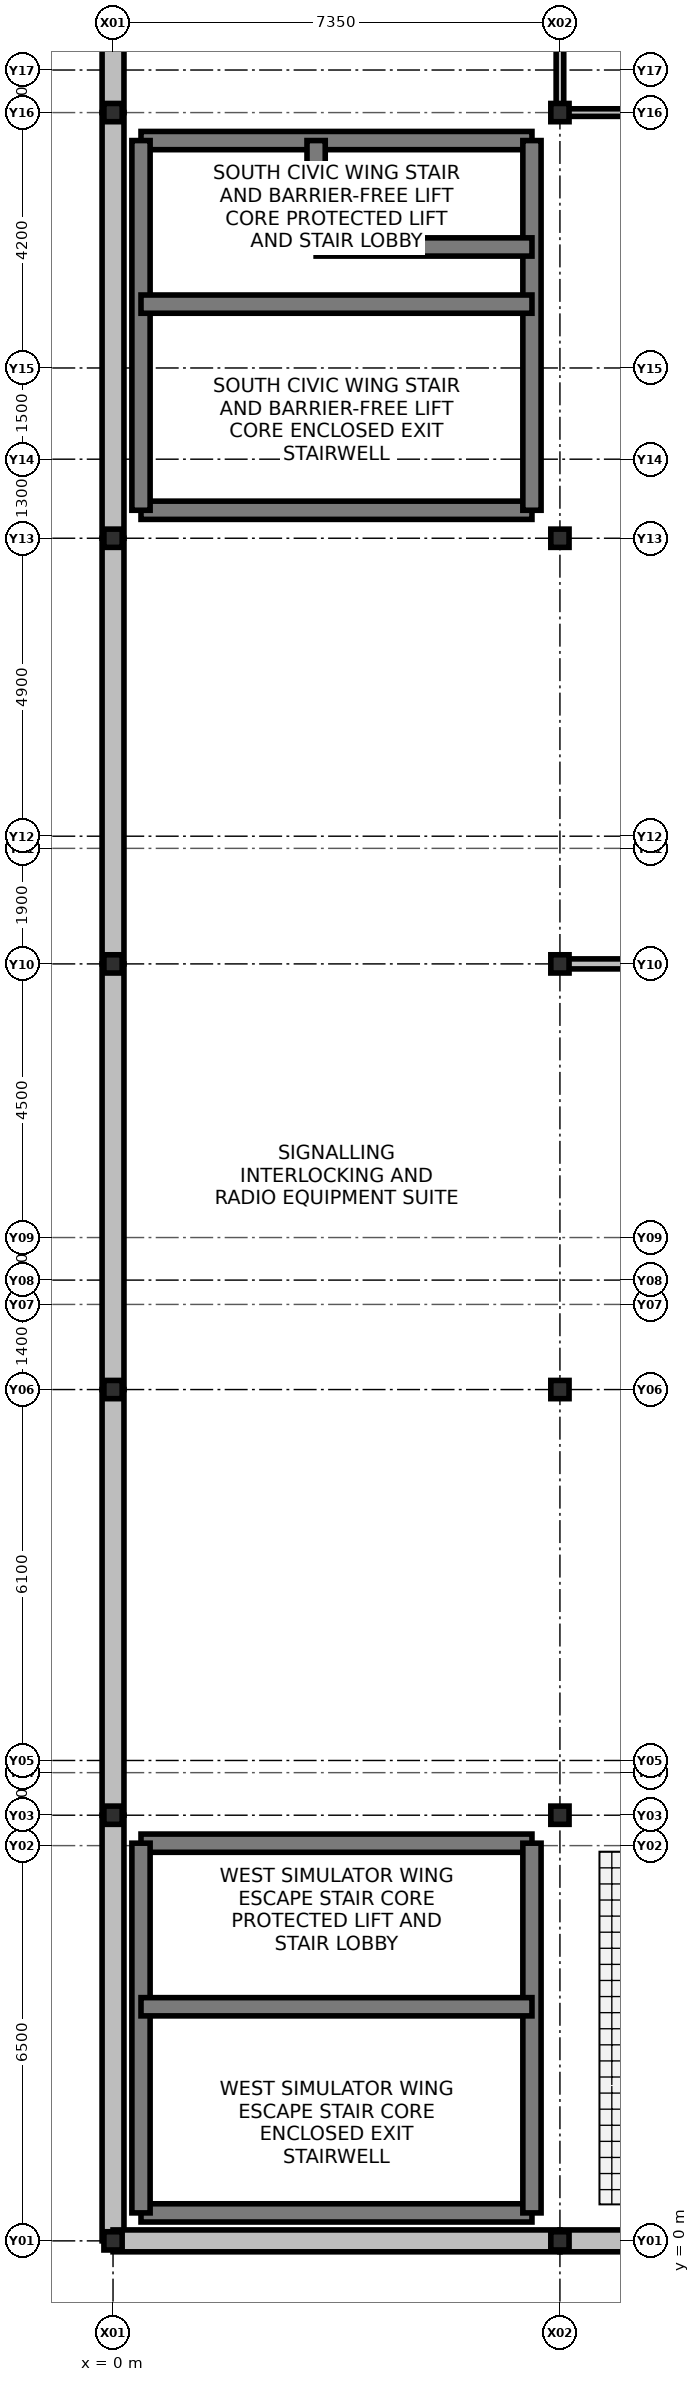
"""IFC4 building model, lengths in metres.
Left out: names, types, materials, properties, quantities, classifications, styles, units other than length and angle.
Written with IfcOpenShell. Run it as: python <this file> out.ifc"""

import sys

from ifc_helpers import new_model, si_unit, direction, frame, frame_2d, origin, origin_with_axes, origin_2d, place, context, subcontext, project, spatial, rectangle, i_section, extrude, element, fill, save


model = new_model("IFC4")
c1 = context("Model", 3, precision=1e-05, world=origin(), true_north=direction((0.0, 1.0)))
c2 = subcontext(c1, "Body", "Model", "MODEL_VIEW")
j1 = project(units=[si_unit("LENGTHUNIT", "METRE"), si_unit("PLANEANGLEUNIT", "RADIAN")], contexts=[c1])
p1 = place(None, origin())
s1 = spatial("IfcSite", under=j1, at=p1, CompositionType="ELEMENT")
p2 = place(p1, origin())
s2 = spatial("IfcBuilding", under=s1, at=p2, CompositionType="ELEMENT")
p3 = place(p2, frame((0.0, 0.0, 11.1)))
s3 = spatial("IfcBuildingStorey", under=s2, at=p3, CompositionType="ELEMENT", Elevation=11.1)
for number, where, z_axis, x_axis in (
    (1, (0.0, 0.0, 0.0), (0.0, 0.0, 1.0), (1.0, 0.0, 0.0)),
    (2, (0.0, 7.0, 0.0), (0.0, 0.0, 1.0), (1.0, 0.0, 0.0)),
    (3, (0.0, 14.0, 0.0), (0.0, 0.0, 1.0), (1.0, 0.0, 0.0)),
    (4, (0.0, 21.0, 0.0), (0.0, 0.0, 1.0), (1.0, 0.0, 0.0)),
    (5, (0.0, 28.0, 0.0), (0.0, 0.0, 1.0), (1.0, 0.0, 0.0)),
    (6, (0.0, 35.0, 0.0), (0.0, 0.0, 1.0), (1.0, 0.0, 0.0)),
    (7, (7.35, 0.0, 0.0), (0.0, 0.0, 1.0), (1.0, 0.0, 0.0)),
    (8, (7.35, 7.0, 0.0), (0.0, 0.0, 1.0), (1.0, 0.0, 0.0)),
    (9, (7.35, 14.0, 0.0), (0.0, 0.0, 1.0), (1.0, 0.0, 0.0)),
    (10, (7.35, 21.0, 0.0), (0.0, 0.0, 1.0), (1.0, 0.0, 0.0)),
    (11, (7.35, 28.0, 0.0), (0.0, 0.0, 1.0), (1.0, 0.0, 0.0)),
    (12, (7.35, 35.0, 0.0), (0.0, 0.0, 1.0), (1.0, 0.0, 0.0)),
):
    element("IfcColumn", number, at=place(p3, frame(where, z_axis=z_axis, x_axis=x_axis)), inside=s3, PredefinedType="COLUMN", context=c2, shape_type="SweptSolid", body=[
        extrude(i_section(OverallWidth=0.3, OverallDepth=0.3, WebThickness=0.01, FlangeThickness=0.015, at=origin_2d()), origin(), (0.0, 0.0, 1.0), 4.2),
    ])
p4 = place(p3, frame((0.0, 0.0, 0.0), z_axis=(0.0, 0.0, 1.0), x_axis=(0.0, 1.0, 0.0)))
e13 = element("IfcWall", 13, at=p4, inside=s3, PredefinedType="SOLIDWALL", context=c2, shape_type="SweptSolid", body=[
    extrude(rectangle(XDim=7.0, YDim=0.36, at=frame_2d((3.5, 0.0))), origin(), (0.0, 0.0, 1.0), 3.35),
])
p5 = place(p4, frame((2.2, 0.0, 0.95)))
e14 = element("IfcOpeningElement", 14, at=p5, cuts=e13, PredefinedType="OPENING", context=c2, shape_type="SweptSolid", body=[
    extrude(rectangle(XDim=2.3, YDim=1.85, at=frame_2d((1.15, 0.925))), frame((0.0, 0.19, 0.0), z_axis=(0.0, -1.0, 0.0), x_axis=(1.0, 0.0, 0.0)), (0.0, 0.0, 1.0), 0.38),
])
p6 = place(p3, frame((0.0, 7.0, 0.0), z_axis=(0.0, 0.0, 1.0), x_axis=(0.0, 1.0, 0.0)))
e15 = element("IfcWall", 15, at=p6, inside=s3, PredefinedType="SOLIDWALL", context=c2, shape_type="SweptSolid", body=[
    extrude(rectangle(XDim=7.0, YDim=0.36, at=frame_2d((3.5, 0.0))), origin(), (0.0, 0.0, 1.0), 3.35),
])
p7 = place(p6, frame((2.2, 0.0, 0.95)))
e16 = element("IfcOpeningElement", 16, at=p7, cuts=e15, PredefinedType="OPENING", context=c2, shape_type="SweptSolid", body=[
    extrude(rectangle(XDim=2.95, YDim=2.15, at=frame_2d((1.475, 1.075))), frame((0.0, 0.19, 0.0), z_axis=(0.0, -1.0, 0.0), x_axis=(1.0, 0.0, 0.0)), (0.0, 0.0, 1.0), 0.38),
])
p8 = place(p3, frame((0.0, 14.0, 0.0), z_axis=(0.0, 0.0, 1.0), x_axis=(0.0, 1.0, 0.0)))
e17 = element("IfcWall", 17, at=p8, inside=s3, PredefinedType="SOLIDWALL", context=c2, shape_type="SweptSolid", body=[
    extrude(rectangle(XDim=7.0, YDim=0.36, at=frame_2d((3.5, 0.0))), origin(), (0.0, 0.0, 1.0), 3.35),
])
p9 = place(p8, frame((2.2, 0.0, 0.95)))
e18 = element("IfcOpeningElement", 18, at=p9, cuts=e17, PredefinedType="OPENING", context=c2, shape_type="SweptSolid", body=[
    extrude(rectangle(XDim=1.2, YDim=1.5, at=frame_2d((0.6, 0.75))), frame((0.0, 0.19, 0.0), z_axis=(0.0, -1.0, 0.0), x_axis=(1.0, 0.0, 0.0)), (0.0, 0.0, 1.0), 0.38),
])
p10 = place(p3, frame((0.0, 21.0, 0.0), z_axis=(0.0, 0.0, 1.0), x_axis=(0.0, 1.0, 0.0)))
e19 = element("IfcWall", 19, at=p10, inside=s3, PredefinedType="SOLIDWALL", context=c2, shape_type="SweptSolid", body=[
    extrude(rectangle(XDim=7.0, YDim=0.36, at=frame_2d((3.5, 0.0))), origin(), (0.0, 0.0, 1.0), 3.35),
])
p11 = place(p10, frame((2.2, 0.0, 0.95)))
e20 = element("IfcOpeningElement", 20, at=p11, cuts=e19, PredefinedType="OPENING", context=c2, shape_type="SweptSolid", body=[
    extrude(rectangle(XDim=1.8, YDim=2.1, at=frame_2d((0.9, 1.05))), frame((0.0, 0.19, 0.0), z_axis=(0.0, -1.0, 0.0), x_axis=(1.0, 0.0, 0.0)), (0.0, 0.0, 1.0), 0.38),
])
p12 = place(p3, frame((0.0, 28.0, 0.0), z_axis=(0.0, 0.0, 1.0), x_axis=(0.0, 1.0, 0.0)))
e21 = element("IfcWall", 21, at=p12, inside=s3, PredefinedType="SOLIDWALL", context=c2, shape_type="SweptSolid", body=[
    extrude(rectangle(XDim=7.0, YDim=0.36, at=frame_2d((3.5, 0.0))), origin(), (0.0, 0.0, 1.0), 3.35),
])
p13 = place(p12, frame((2.2, 0.0, 0.95)))
e22 = element("IfcOpeningElement", 22, at=p13, cuts=e21, PredefinedType="OPENING", context=c2, shape_type="SweptSolid", body=[
    extrude(rectangle(XDim=2.6, YDim=2.0, at=frame_2d((1.3, 1.0))), frame((0.0, 0.19, 0.0), z_axis=(0.0, -1.0, 0.0), x_axis=(1.0, 0.0, 0.0)), (0.0, 0.0, 1.0), 0.38),
])
p14 = place(p3, frame((0.0, 35.0, 0.0), z_axis=(0.0, 0.0, 1.0), x_axis=(0.0, 1.0, 0.0)))
e23 = element("IfcWall", 23, at=p14, inside=s3, PredefinedType="SOLIDWALL", context=c2, shape_type="SweptSolid", body=[
    extrude(rectangle(XDim=7.0, YDim=0.36, at=frame_2d((3.5, 0.0))), origin(), (0.0, 0.0, 1.0), 3.35),
])
p15 = place(p14, frame((2.2, 0.0, 0.95)))
e24 = element("IfcOpeningElement", 24, at=p15, cuts=e23, PredefinedType="OPENING", context=c2, shape_type="SweptSolid", body=[
    extrude(rectangle(XDim=3.4, YDim=2.2, at=frame_2d((1.7, 1.1))), frame((0.0, 0.19, 0.0), z_axis=(0.0, -1.0, 0.0), x_axis=(1.0, 0.0, 0.0)), (0.0, 0.0, 1.0), 0.38),
])
p16 = place(p3, origin_with_axes())
e25 = element("IfcWall", 25, at=p16, inside=s3, PredefinedType="SOLIDWALL", context=c2, shape_type="SweptSolid", body=[
    extrude(rectangle(XDim=7.35, YDim=0.36, at=frame_2d((3.675, 0.0))), origin(), (0.0, 0.0, 1.0), 3.35),
])
p17 = place(p16, frame((2.4, 0.0, 0.9)))
e26 = element("IfcOpeningElement", 26, at=p17, cuts=e25, PredefinedType="OPENING", context=c2, shape_type="SweptSolid", body=[
    extrude(rectangle(XDim=2.0, YDim=1.8, at=frame_2d((1.0, 0.9))), frame((0.0, 0.19, 0.0), z_axis=(0.0, -1.0, 0.0), x_axis=(1.0, 0.0, 0.0)), (0.0, 0.0, 1.0), 0.38),
])
p18 = place(p3, frame((7.35, 0.0, 0.0), z_axis=(0.0, 0.0, 1.0), x_axis=(1.0, 0.0, 0.0)))
e27 = element("IfcWall", 27, at=p18, inside=s3, PredefinedType="SOLIDWALL", context=c2, shape_type="SweptSolid", body=[
    extrude(rectangle(XDim=7.35, YDim=0.36, at=frame_2d((3.675, 0.0))), origin(), (0.0, 0.0, 1.0), 3.35),
])
p19 = place(p18, frame((2.4, 0.0, 0.9)))
e28 = element("IfcOpeningElement", 28, at=p19, cuts=e27, PredefinedType="OPENING", context=c2, shape_type="SweptSolid", body=[
    extrude(rectangle(XDim=2.1, YDim=2.1, at=frame_2d((1.05, 1.05))), frame((0.0, 0.19, 0.0), z_axis=(0.0, -1.0, 0.0), x_axis=(1.0, 0.0, 0.0)), (0.0, 0.0, 1.0), 0.38),
])
p20 = place(p3, frame((0.46, 28.46, 0.0), z_axis=(0.0, 0.0, 1.0), x_axis=(1.0, 0.0, 0.0)))
e29 = element("IfcWall", 29, at=p20, inside=s3, PredefinedType="SHEAR", context=c2, shape_type="SweptSolid", body=[
    extrude(rectangle(XDim=6.43, YDim=0.3, at=frame_2d((3.215, 0.0))), origin(), (0.0, 0.0, 1.0), 3.92),
])
p21 = place(p3, frame((0.46, 34.54, 0.0), z_axis=(0.0, 0.0, 1.0), x_axis=(1.0, 0.0, 0.0)))
e30 = element("IfcWall", 30, at=p21, inside=s3, PredefinedType="SHEAR", context=c2, shape_type="SweptSolid", body=[
    extrude(rectangle(XDim=6.43, YDim=0.3, at=frame_2d((3.215, 0.0))), origin(), (0.0, 0.0, 1.0), 3.92),
])
p22 = place(p21, frame((0.55, 0.0, 0.0)))
e31 = element("IfcOpeningElement", 31, at=p22, cuts=e30, PredefinedType="OPENING", context=c2, shape_type="SweptSolid", body=[
    extrude(rectangle(XDim=1.5, YDim=2.2, at=frame_2d((0.75, 1.1))), frame((0.0, 0.16, 0.0), z_axis=(0.0, -1.0, 0.0), x_axis=(1.0, 0.0, 0.0)), (0.0, 0.0, 1.0), 0.32),
])
for number, where, z_axis, x_axis in (
    (32, (0.46, 28.46, 0.0), (0.0, 0.0, 1.0), (0.0, 1.0, 0.0)),
    (33, (6.89, 28.46, 0.0), (0.0, 0.0, 1.0), (0.0, 1.0, 0.0)),
):
    element("IfcWall", number, at=place(p3, frame(where, z_axis=z_axis, x_axis=x_axis)), inside=s3, PredefinedType="SHEAR", context=c2, shape_type="SweptSolid", body=[
        extrude(rectangle(XDim=6.08, YDim=0.3, at=frame_2d((3.04, 0.0))), origin(), (0.0, 0.0, 1.0), 3.92),
    ])
p23 = place(p3, frame((0.46, 31.85, 0.0), z_axis=(0.0, 0.0, 1.0), x_axis=(1.0, 0.0, 0.0)))
e34 = element("IfcWall", 34, at=p23, inside=s3, PredefinedType="SHEAR", context=c2, shape_type="SweptSolid", body=[
    extrude(rectangle(XDim=6.43, YDim=0.3, at=frame_2d((3.215, 0.0))), origin(), (0.0, 0.0, 1.0), 3.92),
])
p24 = place(p23, frame((0.185, 0.0, 0.0)))
e35 = element("IfcOpeningElement", 35, at=p24, cuts=e34, PredefinedType="OPENING", context=c2, shape_type="SweptSolid", body=[
    extrude(rectangle(XDim=1.05, YDim=2.15, at=frame_2d((0.525, 1.075))), frame((0.0, 0.16, 0.0), z_axis=(0.0, -1.0, 0.0), x_axis=(1.0, 0.0, 0.0)), (0.0, 0.0, 1.0), 0.32),
])
p25 = place(p3, frame((3.34, 32.79, 0.0), z_axis=(0.0, 0.0, 1.0), x_axis=(0.0, 1.0, 0.0)))
e36 = element("IfcWall", 36, at=p25, inside=s3, PredefinedType="SHEAR", context=c2, shape_type="SweptSolid", body=[
    extrude(rectangle(XDim=1.75, YDim=0.3, at=frame_2d((0.875, 0.0))), origin(), (0.0, 0.0, 1.0), 3.92),
])
p26 = place(p3, frame((3.34, 32.79, 0.0), z_axis=(0.0, 0.0, 1.0), x_axis=(1.0, 0.0, 0.0)))
e37 = element("IfcWall", 37, at=p26, inside=s3, PredefinedType="SHEAR", context=c2, shape_type="SweptSolid", body=[
    extrude(rectangle(XDim=3.55, YDim=0.3, at=frame_2d((1.775, 0.0))), origin(), (0.0, 0.0, 1.0), 3.92),
])
p27 = place(p26, frame((0.25, 0.0, 0.0)))
e38 = element("IfcOpeningElement", 38, at=p27, cuts=e37, PredefinedType="OPENING", context=c2, shape_type="SweptSolid", body=[
    extrude(rectangle(XDim=1.1, YDim=2.15, at=frame_2d((0.55, 1.075))), frame((0.0, 0.16, 0.0), z_axis=(0.0, -1.0, 0.0), x_axis=(1.0, 0.0, 0.0)), (0.0, 0.0, 1.0), 0.32),
])
p28 = place(p26, frame((1.75, 0.0, 0.0)))
e39 = element("IfcOpeningElement", 39, at=p28, cuts=e37, PredefinedType="OPENING", context=c2, shape_type="SweptSolid", body=[
    extrude(rectangle(XDim=1.2, YDim=2.2, at=frame_2d((0.6, 1.1))), frame((0.0, 0.16, 0.0), z_axis=(0.0, -1.0, 0.0), x_axis=(1.0, 0.0, 0.0)), (0.0, 0.0, 1.0), 0.32),
])
p29 = place(p3, frame((0.46, 0.46, 0.0), z_axis=(0.0, 0.0, 1.0), x_axis=(1.0, 0.0, 0.0)))
e40 = element("IfcWall", 40, at=p29, inside=s3, PredefinedType="SHEAR", context=c2, shape_type="SweptSolid", body=[
    extrude(rectangle(XDim=6.43, YDim=0.3, at=frame_2d((3.215, 0.0))), origin(), (0.0, 0.0, 1.0), 3.92),
])
p30 = place(p3, frame((0.46, 6.54, 0.0), z_axis=(0.0, 0.0, 1.0), x_axis=(1.0, 0.0, 0.0)))
e41 = element("IfcWall", 41, at=p30, inside=s3, PredefinedType="SHEAR", context=c2, shape_type="SweptSolid", body=[
    extrude(rectangle(XDim=6.43, YDim=0.3, at=frame_2d((3.215, 0.0))), origin(), (0.0, 0.0, 1.0), 3.92),
])
p31 = place(p30, frame((0.55, 0.0, 0.0)))
e42 = element("IfcOpeningElement", 42, at=p31, cuts=e41, PredefinedType="OPENING", context=c2, shape_type="SweptSolid", body=[
    extrude(rectangle(XDim=1.5, YDim=2.2, at=frame_2d((0.75, 1.1))), frame((0.0, 0.16, 0.0), z_axis=(0.0, -1.0, 0.0), x_axis=(1.0, 0.0, 0.0)), (0.0, 0.0, 1.0), 0.32),
])
for number, where, z_axis, x_axis in (
    (43, (0.46, 0.46, 0.0), (0.0, 0.0, 1.0), (0.0, 1.0, 0.0)),
    (44, (6.89, 0.46, 0.0), (0.0, 0.0, 1.0), (0.0, 1.0, 0.0)),
):
    element("IfcWall", number, at=place(p3, frame(where, z_axis=z_axis, x_axis=x_axis)), inside=s3, PredefinedType="SHEAR", context=c2, shape_type="SweptSolid", body=[
        extrude(rectangle(XDim=6.08, YDim=0.3, at=frame_2d((3.04, 0.0))), origin(), (0.0, 0.0, 1.0), 3.92),
    ])
p32 = place(p3, frame((0.46, 3.85, 0.0), z_axis=(0.0, 0.0, 1.0), x_axis=(1.0, 0.0, 0.0)))
e45 = element("IfcWall", 45, at=p32, inside=s3, PredefinedType="SHEAR", context=c2, shape_type="SweptSolid", body=[
    extrude(rectangle(XDim=6.43, YDim=0.3, at=frame_2d((3.215, 0.0))), origin(), (0.0, 0.0, 1.0), 3.92),
])
p33 = place(p32, frame((0.185, 0.0, 0.0)))
e46 = element("IfcOpeningElement", 46, at=p33, cuts=e45, PredefinedType="OPENING", context=c2, shape_type="SweptSolid", body=[
    extrude(rectangle(XDim=1.05, YDim=2.15, at=frame_2d((0.525, 1.075))), frame((0.0, 0.16, 0.0), z_axis=(0.0, -1.0, 0.0), x_axis=(1.0, 0.0, 0.0)), (0.0, 0.0, 1.0), 0.32),
])
p34 = place(p3, frame((7.35, 21.0, 0.0), z_axis=(0.0, 0.0, 1.0), x_axis=(1.0, 0.0, 0.0)))
e47 = element("IfcWall", 47, at=p34, inside=s3, PredefinedType="PARTITIONING", context=c2, shape_type="SweptSolid", body=[
    extrude(rectangle(XDim=29.4, YDim=0.165, at=frame_2d((14.7, 0.0))), origin(), (0.0, 0.0, 1.0), 3.15),
])
p35 = place(p34, frame((4.0, 0.0, 0.0)))
e48 = element("IfcOpeningElement", 48, at=p35, cuts=e47, PredefinedType="OPENING", context=c2, shape_type="SweptSolid", body=[
    extrude(rectangle(XDim=1.35, YDim=2.2, at=frame_2d((0.675, 1.1))), frame((0.0, 0.092, 0.0), z_axis=(0.0, -1.0, 0.0), x_axis=(1.0, 0.0, 0.0)), (0.0, 0.0, 1.0), 0.185),
])
p36 = place(p34, frame((18.5, 0.0, 0.0)))
e49 = element("IfcOpeningElement", 49, at=p36, cuts=e47, PredefinedType="OPENING", context=c2, shape_type="SweptSolid", body=[
    extrude(rectangle(XDim=1.4, YDim=2.2, at=frame_2d((0.7, 1.1))), frame((0.0, 0.092, 0.0), z_axis=(0.0, -1.0, 0.0), x_axis=(1.0, 0.0, 0.0)), (0.0, 0.0, 1.0), 0.185),
])
p37 = place(p3, frame((7.35, 35.0, 0.0), z_axis=(0.0, 0.0, 1.0), x_axis=(1.0, 0.0, 0.0)))
e50 = element("IfcWall", 50, at=p37, inside=s3, PredefinedType="PARTITIONING", context=c2, shape_type="SweptSolid", body=[
    extrude(rectangle(XDim=14.7, YDim=0.125, at=frame_2d((7.35, 0.0))), origin(), (0.0, 0.0, 1.0), 3.15),
])
p38 = place(p37, frame((4.2, 0.0, 0.0)))
e51 = element("IfcOpeningElement", 51, at=p38, cuts=e50, PredefinedType="OPENING", context=c2, shape_type="SweptSolid", body=[
    extrude(rectangle(XDim=1.15, YDim=2.15, at=frame_2d((0.575, 1.075))), frame((0.0, 0.072, 0.0), z_axis=(0.0, -1.0, 0.0), x_axis=(1.0, 0.0, 0.0)), (0.0, 0.0, 1.0), 0.145),
])
p39 = place(p3, frame((7.35, 35.0, 0.0), z_axis=(0.0, 0.0, 1.0), x_axis=(0.0, 1.0, 0.0)))
e52 = element("IfcWall", 52, at=p39, inside=s3, PredefinedType="PARTITIONING", context=c2, shape_type="SweptSolid", body=[
    extrude(rectangle(XDim=28.0, YDim=0.125, at=frame_2d((14.0, 0.0))), origin(), (0.0, 0.0, 1.0), 3.15),
])
p40 = place(p39, frame((4.0, 0.0, 0.0)))
e53 = element("IfcOpeningElement", 53, at=p40, cuts=e52, PredefinedType="OPENING", context=c2, shape_type="SweptSolid", body=[
    extrude(rectangle(XDim=0.9, YDim=2.1, at=frame_2d((0.45, 1.05))), frame((0.0, 0.072, 0.0), z_axis=(0.0, -1.0, 0.0), x_axis=(1.0, 0.0, 0.0)), (0.0, 0.0, 1.0), 0.145),
])
p41 = place(p39, frame((11.0, 0.0, 0.0)))
e54 = element("IfcOpeningElement", 54, at=p41, cuts=e52, PredefinedType="OPENING", context=c2, shape_type="SweptSolid", body=[
    extrude(rectangle(XDim=0.95, YDim=2.2, at=frame_2d((0.475, 1.1))), frame((0.0, 0.072, 0.0), z_axis=(0.0, -1.0, 0.0), x_axis=(1.0, 0.0, 0.0)), (0.0, 0.0, 1.0), 0.145),
])
p42 = place(p5, origin())
e55 = element("IfcWindow", 55, at=p42, inside=s3, PartitioningType="SINGLE_PANEL", PredefinedType="WINDOW", context=c2, shape_type="SweptSolid", body=[
    extrude(rectangle(XDim=2.3, YDim=1.85, at=frame_2d((1.15, 0.925))), frame((0.0, 0.03, 0.0), z_axis=(0.0, -1.0, 0.0), x_axis=(1.0, 0.0, 0.0)), (0.0, 0.0, 1.0), 0.06),
])
fill(e14, e55)
p43 = place(p7, origin())
e56 = element("IfcWindow", 56, at=p43, inside=s3, PartitioningType="SINGLE_PANEL", PredefinedType="WINDOW", context=c2, shape_type="SweptSolid", body=[
    extrude(rectangle(XDim=2.95, YDim=2.15, at=frame_2d((1.475, 1.075))), frame((0.0, 0.03, 0.0), z_axis=(0.0, -1.0, 0.0), x_axis=(1.0, 0.0, 0.0)), (0.0, 0.0, 1.0), 0.06),
])
fill(e16, e56)
p44 = place(p9, origin())
e57 = element("IfcWindow", 57, at=p44, inside=s3, PartitioningType="SINGLE_PANEL", PredefinedType="WINDOW", context=c2, shape_type="SweptSolid", body=[
    extrude(rectangle(XDim=1.2, YDim=1.5, at=frame_2d((0.6, 0.75))), frame((0.0, 0.03, 0.0), z_axis=(0.0, -1.0, 0.0), x_axis=(1.0, 0.0, 0.0)), (0.0, 0.0, 1.0), 0.06),
])
fill(e18, e57)
p45 = place(p11, origin())
e58 = element("IfcWindow", 58, at=p45, inside=s3, PartitioningType="SINGLE_PANEL", PredefinedType="WINDOW", context=c2, shape_type="SweptSolid", body=[
    extrude(rectangle(XDim=1.8, YDim=2.1, at=frame_2d((0.9, 1.05))), frame((0.0, 0.03, 0.0), z_axis=(0.0, -1.0, 0.0), x_axis=(1.0, 0.0, 0.0)), (0.0, 0.0, 1.0), 0.06),
])
fill(e20, e58)
p46 = place(p13, origin())
e59 = element("IfcWindow", 59, at=p46, inside=s3, PartitioningType="SINGLE_PANEL", PredefinedType="WINDOW", context=c2, shape_type="SweptSolid", body=[
    extrude(rectangle(XDim=2.6, YDim=2.0, at=frame_2d((1.3, 1.0))), frame((0.0, 0.03, 0.0), z_axis=(0.0, -1.0, 0.0), x_axis=(1.0, 0.0, 0.0)), (0.0, 0.0, 1.0), 0.06),
])
fill(e22, e59)
p47 = place(p17, origin())
e60 = element("IfcWindow", 60, at=p47, inside=s3, PartitioningType="SINGLE_PANEL", PredefinedType="WINDOW", context=c2, shape_type="SweptSolid", body=[
    extrude(rectangle(XDim=2.0, YDim=1.8, at=frame_2d((1.0, 0.9))), frame((0.0, 0.03, 0.0), z_axis=(0.0, -1.0, 0.0), x_axis=(1.0, 0.0, 0.0)), (0.0, 0.0, 1.0), 0.06),
])
fill(e26, e60)
p48 = place(p24, origin())
e61 = element("IfcDoor", 61, at=p48, inside=s3, OperationType="SINGLE_SWING_RIGHT", PredefinedType="DOOR", context=c2, shape_type="SweptSolid", body=[
    extrude(rectangle(XDim=1.05, YDim=2.15, at=frame_2d((0.525, 1.075))), frame((0.0, 0.025, 0.0), z_axis=(0.0, -1.0, 0.0), x_axis=(1.0, 0.0, 0.0)), (0.0, 0.0, 1.0), 0.05),
])
fill(e35, e61)
p49 = place(p22, origin())
e62 = element("IfcDoor", 62, at=p49, inside=s3, OperationType="DOUBLE_DOOR_SINGLE_SWING", PredefinedType="DOOR", context=c2, shape_type="SweptSolid", body=[
    extrude(rectangle(XDim=1.5, YDim=2.2, at=frame_2d((0.75, 1.1))), frame((0.0, 0.025, 0.0), z_axis=(0.0, -1.0, 0.0), x_axis=(1.0, 0.0, 0.0)), (0.0, 0.0, 1.0), 0.05),
])
fill(e31, e62)
p50 = place(p27, origin())
e63 = element("IfcDoor", 63, at=p50, inside=s3, OperationType="SLIDING_TO_LEFT", PredefinedType="DOOR", context=c2, shape_type="SweptSolid", body=[
    extrude(rectangle(XDim=1.1, YDim=2.15, at=frame_2d((0.55, 1.075))), frame((0.0, 0.025, 0.0), z_axis=(0.0, -1.0, 0.0), x_axis=(1.0, 0.0, 0.0)), (0.0, 0.0, 1.0), 0.05),
])
fill(e38, e63)
p51 = place(p28, origin())
e64 = element("IfcDoor", 64, at=p51, inside=s3, OperationType="SLIDING_TO_RIGHT", PredefinedType="DOOR", context=c2, shape_type="SweptSolid", body=[
    extrude(rectangle(XDim=1.2, YDim=2.2, at=frame_2d((0.6, 1.1))), frame((0.0, 0.025, 0.0), z_axis=(0.0, -1.0, 0.0), x_axis=(1.0, 0.0, 0.0)), (0.0, 0.0, 1.0), 0.05),
])
fill(e39, e64)
p52 = place(p33, origin())
e65 = element("IfcDoor", 65, at=p52, inside=s3, OperationType="SINGLE_SWING_RIGHT", PredefinedType="DOOR", context=c2, shape_type="SweptSolid", body=[
    extrude(rectangle(XDim=1.05, YDim=2.15, at=frame_2d((0.525, 1.075))), frame((0.0, 0.025, 0.0), z_axis=(0.0, -1.0, 0.0), x_axis=(1.0, 0.0, 0.0)), (0.0, 0.0, 1.0), 0.05),
])
fill(e46, e65)
p53 = place(p31, origin())
e66 = element("IfcDoor", 66, at=p53, inside=s3, OperationType="DOUBLE_DOOR_SINGLE_SWING", PredefinedType="DOOR", context=c2, shape_type="SweptSolid", body=[
    extrude(rectangle(XDim=1.5, YDim=2.2, at=frame_2d((0.75, 1.1))), frame((0.0, 0.025, 0.0), z_axis=(0.0, -1.0, 0.0), x_axis=(1.0, 0.0, 0.0)), (0.0, 0.0, 1.0), 0.05),
])
fill(e42, e66)
save(model, sys.argv[1])
